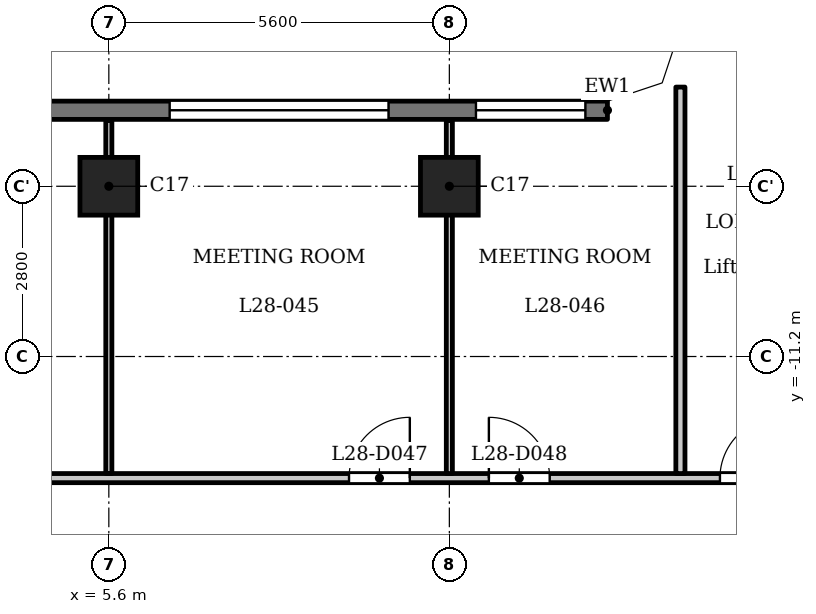
"""IFC4 building model, lengths in metres.
Left out: names, types, materials, properties, quantities, classifications, styles, units other than length and angle.
Written with IfcOpenShell. Run it as: python <this file> out.ifc"""

import sys

from ifc_helpers import new_model, si_unit, direction, frame, frame_2d, origin, origin_2d, place, context, subcontext, project, spatial, polyline, rectangle, outline, extrude, element, fill, save


model = new_model("IFC4")
c1 = context("Model", 3, precision=1e-05, world=origin(), true_north=direction((0.0, 1.0)))
c2 = subcontext(c1, "Body", "Model", "MODEL_VIEW")
j1 = project(units=[si_unit("LENGTHUNIT", "METRE"), si_unit("PLANEANGLEUNIT", "RADIAN")], contexts=[c1])
p1 = place(None, origin())
s1 = spatial("IfcSite", under=j1, at=p1, CompositionType="ELEMENT")
p2 = place(p1, origin())
s2 = spatial("IfcBuilding", under=s1, at=p2, CompositionType="ELEMENT")
p3 = place(p2, frame((0.0, 0.0, 111.3)))
s3 = spatial("IfcBuildingStorey", under=s2, at=p3, CompositionType="ELEMENT", Elevation=111.3)
for number, where, z_axis, x_axis in (
    (1, (5.6, -8.4, 0.0), (0.0, 0.0, 1.0), (1.0, 0.0, 0.0)),
    (2, (11.2, -8.4, 0.0), (0.0, 0.0, 1.0), (1.0, 0.0, 0.0)),
):
    element("IfcColumn", number, at=place(p3, frame(where, z_axis=z_axis, x_axis=x_axis)), inside=s3, PredefinedType="COLUMN", context=c2, shape_type="SweptSolid", body=[
        extrude(rectangle(XDim=0.95, YDim=0.95, at=origin_2d()), origin(), (0.0, 0.0, 1.0), 3.5),
    ])
p4 = place(p3, frame((13.8, -7.15, 0.0), z_axis=(0.0, 0.0, 1.0), x_axis=(-1.0, 0.0, 0.0)))
e3 = element("IfcWall", 3, at=p4, inside=s3, PredefinedType="SOLIDWALL", context=c2, shape_type="SweptSolid", body=[
    extrude(rectangle(XDim=27.6, YDim=0.3, at=frame_2d((13.8, 0.0))), origin(), (0.0, 0.0, 1.0), 3.2),
])
p5 = place(p4, frame((0.363, 0.0, 0.9)))
e4 = element("IfcOpeningElement", 4, at=p5, cuts=e3, PredefinedType="OPENING", context=c2, shape_type="SweptSolid", body=[
    extrude(rectangle(XDim=1.8, YDim=1.25, at=frame_2d((0.9, 0.625))), frame((0.0, 0.16, 0.0), z_axis=(0.0, -1.0, 0.0), x_axis=(1.0, 0.0, 0.0)), (0.0, 0.0, 1.0), 0.32),
])
p6 = place(p4, frame((3.6, 0.0, 1.2)))
e5 = element("IfcOpeningElement", 5, at=p6, cuts=e3, PredefinedType="OPENING", context=c2, shape_type="SweptSolid", body=[
    extrude(rectangle(XDim=3.6, YDim=0.95, at=frame_2d((1.8, 0.475))), frame((0.0, 0.16, 0.0), z_axis=(0.0, -1.0, 0.0), x_axis=(1.0, 0.0, 0.0)), (0.0, 0.0, 1.0), 0.32),
])
p7 = place(p4, frame((9.2, 0.0, 1.2)))
e6 = element("IfcOpeningElement", 6, at=p7, cuts=e3, PredefinedType="OPENING", context=c2, shape_type="SweptSolid", body=[
    extrude(rectangle(XDim=3.6, YDim=0.95, at=frame_2d((1.8, 0.475))), frame((0.0, 0.16, 0.0), z_axis=(0.0, -1.0, 0.0), x_axis=(1.0, 0.0, 0.0)), (0.0, 0.0, 1.0), 0.32),
])
p8 = place(p4, frame((14.8, 0.0, 1.2)))
e7 = element("IfcOpeningElement", 7, at=p8, cuts=e3, PredefinedType="OPENING", context=c2, shape_type="SweptSolid", body=[
    extrude(rectangle(XDim=3.6, YDim=0.95, at=frame_2d((1.8, 0.475))), frame((0.0, 0.16, 0.0), z_axis=(0.0, -1.0, 0.0), x_axis=(1.0, 0.0, 0.0)), (0.0, 0.0, 1.0), 0.32),
])
p9 = place(p4, frame((20.4, 0.0, 1.2)))
e8 = element("IfcOpeningElement", 8, at=p9, cuts=e3, PredefinedType="OPENING", context=c2, shape_type="SweptSolid", body=[
    extrude(rectangle(XDim=3.6, YDim=0.95, at=frame_2d((1.8, 0.475))), frame((0.0, 0.16, 0.0), z_axis=(0.0, -1.0, 0.0), x_axis=(1.0, 0.0, 0.0)), (0.0, 0.0, 1.0), 0.32),
])
p10 = place(p4, frame((25.438, 0.0, 0.9)))
e9 = element("IfcOpeningElement", 9, at=p10, cuts=e3, PredefinedType="OPENING", context=c2, shape_type="SweptSolid", body=[
    extrude(rectangle(XDim=1.8, YDim=1.25, at=frame_2d((0.9, 0.625))), frame((0.0, 0.16, 0.0), z_axis=(0.0, -1.0, 0.0), x_axis=(1.0, 0.0, 0.0)), (0.0, 0.0, 1.0), 0.32),
])
p11 = place(p3, frame((-17.4, -13.2, 0.0), z_axis=(0.0, 0.0, 1.0), x_axis=(1.0, 0.0, 0.0)))
e10 = element("IfcWall", 10, at=p11, inside=s3, PredefinedType="PARTITIONING", context=c2, shape_type="SweptSolid", body=[
    extrude(rectangle(XDim=34.8, YDim=0.15, at=frame_2d((17.4, 0.0))), origin(), (0.0, 0.0, 1.0), 3.2),
])
p12 = place(p11, frame((0.65, 0.0, 0.0)))
e11 = element("IfcOpeningElement", 11, at=p12, cuts=e10, PredefinedType="OPENING", context=c2, shape_type="SweptSolid", body=[
    extrude(rectangle(XDim=1.0, YDim=2.1, at=frame_2d((0.5, 1.05))), frame((0.0, 0.085, 0.0), z_axis=(0.0, -1.0, 0.0), x_axis=(1.0, 0.0, 0.0)), (0.0, 0.0, 1.0), 0.17),
])
p13 = place(p11, frame((33.05, 0.0, 0.0)))
e12 = element("IfcOpeningElement", 12, at=p13, cuts=e10, PredefinedType="OPENING", context=c2, shape_type="SweptSolid", body=[
    extrude(rectangle(XDim=1.0, YDim=2.1, at=frame_2d((0.5, 1.05))), frame((0.0, 0.085, 0.0), z_axis=(0.0, -1.0, 0.0), x_axis=(1.0, 0.0, 0.0)), (0.0, 0.0, 1.0), 0.17),
])
p14 = place(p11, frame((4.55, 0.0, 0.0)))
e13 = element("IfcOpeningElement", 13, at=p14, cuts=e10, PredefinedType="OPENING", context=c2, shape_type="SweptSolid", body=[
    extrude(rectangle(XDim=1.0, YDim=2.1, at=frame_2d((0.5, 1.05))), frame((0.0, 0.085, 0.0), z_axis=(0.0, -1.0, 0.0), x_axis=(1.0, 0.0, 0.0)), (0.0, 0.0, 1.0), 0.17),
])
p15 = place(p11, frame((6.9, 0.0, 0.0)))
e14 = element("IfcOpeningElement", 14, at=p15, cuts=e10, PredefinedType="OPENING", context=c2, shape_type="SweptSolid", body=[
    extrude(rectangle(XDim=1.0, YDim=2.1, at=frame_2d((0.5, 1.05))), frame((0.0, 0.085, 0.0), z_axis=(0.0, -1.0, 0.0), x_axis=(1.0, 0.0, 0.0)), (0.0, 0.0, 1.0), 0.17),
])
p16 = place(p11, frame((15.75, 0.0, 0.0)))
e15 = element("IfcOpeningElement", 15, at=p16, cuts=e10, PredefinedType="OPENING", context=c2, shape_type="SweptSolid", body=[
    extrude(rectangle(XDim=1.0, YDim=2.1, at=frame_2d((0.5, 1.05))), frame((0.0, 0.085, 0.0), z_axis=(0.0, -1.0, 0.0), x_axis=(1.0, 0.0, 0.0)), (0.0, 0.0, 1.0), 0.17),
])
p17 = place(p11, frame((18.1, 0.0, 0.0)))
e16 = element("IfcOpeningElement", 16, at=p17, cuts=e10, PredefinedType="OPENING", context=c2, shape_type="SweptSolid", body=[
    extrude(rectangle(XDim=1.0, YDim=2.1, at=frame_2d((0.5, 1.05))), frame((0.0, 0.085, 0.0), z_axis=(0.0, -1.0, 0.0), x_axis=(1.0, 0.0, 0.0)), (0.0, 0.0, 1.0), 0.17),
])
p18 = place(p11, frame((26.95, 0.0, 0.0)))
e17 = element("IfcOpeningElement", 17, at=p18, cuts=e10, PredefinedType="OPENING", context=c2, shape_type="SweptSolid", body=[
    extrude(rectangle(XDim=1.0, YDim=2.1, at=frame_2d((0.5, 1.05))), frame((0.0, 0.085, 0.0), z_axis=(0.0, -1.0, 0.0), x_axis=(1.0, 0.0, 0.0)), (0.0, 0.0, 1.0), 0.17),
])
p19 = place(p11, frame((29.25, 0.0, 0.0)))
e18 = element("IfcOpeningElement", 18, at=p19, cuts=e10, PredefinedType="OPENING", context=c2, shape_type="SweptSolid", body=[
    extrude(rectangle(XDim=1.0, YDim=2.1, at=frame_2d((0.5, 1.05))), frame((0.0, 0.085, 0.0), z_axis=(0.0, -1.0, 0.0), x_axis=(1.0, 0.0, 0.0)), (0.0, 0.0, 1.0), 0.17),
])
for number, where, z_axis, x_axis in (
    (19, (5.6, -13.125, 0.0), (0.0, 0.0, 1.0), (0.0, 1.0, 0.0)),
    (20, (11.2, -13.125, 0.0), (0.0, 0.0, 1.0), (0.0, 1.0, 0.0)),
):
    element("IfcWall", number, at=place(p3, frame(where, z_axis=z_axis, x_axis=x_axis)), inside=s3, PredefinedType="PARTITIONING", context=c2, shape_type="SweptSolid", body=[
        extrude(rectangle(XDim=5.805, YDim=0.1, at=frame_2d((2.902, 0.0))), origin(), (0.0, 0.0, 1.0), 3.2),
    ])
p20 = place(p3, frame((15.0, -13.125, 0.0), z_axis=(0.0, 0.0, 1.0), x_axis=(0.0, 1.0, 0.0)))
e21 = element("IfcWall", 21, at=p20, inside=s3, PredefinedType="PARTITIONING", context=c2, shape_type="SweptSolid", body=[
    extrude(rectangle(XDim=6.356, YDim=0.15, at=frame_2d((3.178, 0.0))), origin(), (0.0, 0.0, 1.0), 3.2),
])
p21 = place(p3, origin())
e22 = element("IfcWall", 22, at=p21, inside=s3, PredefinedType="SOLIDWALL", context=c2, shape_type="SweptSolid", body=[
    extrude(outline(polyline([(14.937, -6.937), (15.3, -5.849), (15.3, -5.8), (15.0, -5.8), (14.7, -6.7), (13.8, -7.0), (13.8, -7.3), (13.849, -7.3), (14.937, -6.937)])), origin(), (0.0, 0.0, 1.0), 3.2),
])
p22 = place(p13, origin())
e23 = element("IfcDoor", 23, at=p22, inside=s3, OperationType="SINGLE_SWING_LEFT", PredefinedType="DOOR", context=c2, shape_type="SweptSolid", body=[
    extrude(rectangle(XDim=1.0, YDim=2.1, at=frame_2d((0.5, 1.05))), frame((0.0, 0.025, 0.0), z_axis=(0.0, -1.0, 0.0), x_axis=(1.0, 0.0, 0.0)), (0.0, 0.0, 1.0), 0.05),
])
fill(e12, e23)
p23 = place(p18, origin())
e24 = element("IfcDoor", 24, at=p23, inside=s3, OperationType="SINGLE_SWING_LEFT", PredefinedType="DOOR", context=c2, shape_type="SweptSolid", body=[
    extrude(rectangle(XDim=1.0, YDim=2.1, at=frame_2d((0.5, 1.05))), frame((0.0, 0.025, 0.0), z_axis=(0.0, -1.0, 0.0), x_axis=(1.0, 0.0, 0.0)), (0.0, 0.0, 1.0), 0.05),
])
fill(e17, e24)
p24 = place(p19, origin())
e25 = element("IfcDoor", 25, at=p24, inside=s3, OperationType="SINGLE_SWING_RIGHT", PredefinedType="DOOR", context=c2, shape_type="SweptSolid", body=[
    extrude(rectangle(XDim=1.0, YDim=2.1, at=frame_2d((0.5, 1.05))), frame((0.0, 0.025, 0.0), z_axis=(0.0, -1.0, 0.0), x_axis=(1.0, 0.0, 0.0)), (0.0, 0.0, 1.0), 0.05),
])
fill(e18, e25)
p25 = place(p5, origin())
e26 = element("IfcWindow", 26, at=p25, inside=s3, PartitioningType="SINGLE_PANEL", PredefinedType="WINDOW", context=c2, shape_type="SweptSolid", body=[
    extrude(rectangle(XDim=1.8, YDim=1.25, at=frame_2d((0.9, 0.625))), frame((0.0, 0.03, 0.0), z_axis=(0.0, -1.0, 0.0), x_axis=(1.0, 0.0, 0.0)), (0.0, 0.0, 1.0), 0.06),
])
fill(e4, e26)
p26 = place(p6, origin())
e27 = element("IfcWindow", 27, at=p26, inside=s3, PartitioningType="SINGLE_PANEL", PredefinedType="WINDOW", context=c2, shape_type="SweptSolid", body=[
    extrude(rectangle(XDim=3.6, YDim=0.95, at=frame_2d((1.8, 0.475))), frame((0.0, 0.03, 0.0), z_axis=(0.0, -1.0, 0.0), x_axis=(1.0, 0.0, 0.0)), (0.0, 0.0, 1.0), 0.06),
])
fill(e5, e27)
save(model, sys.argv[1])
